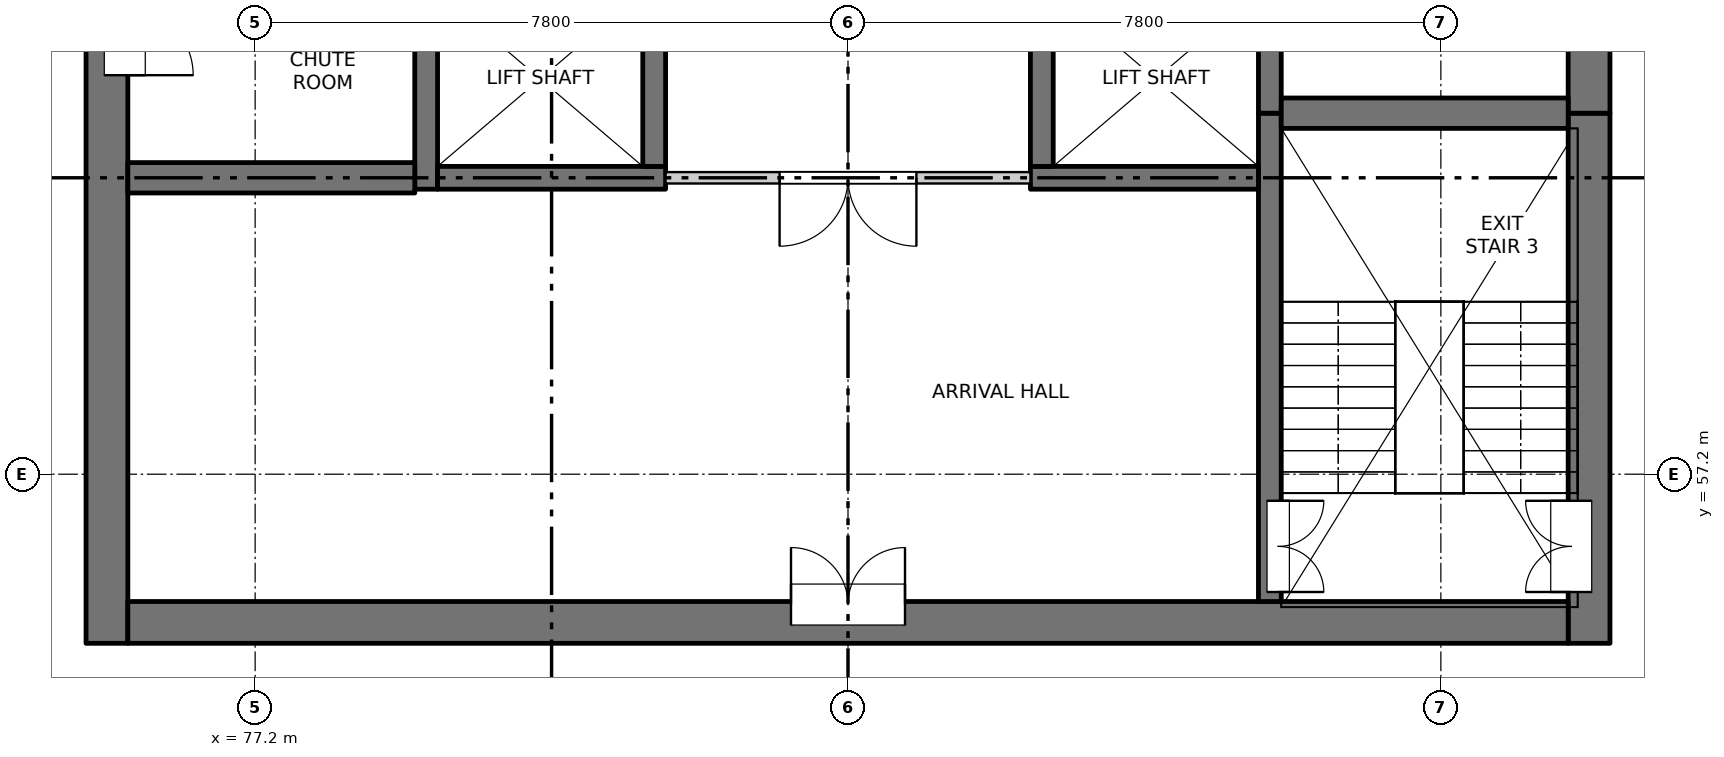
"""IFC4 building model, lengths in metres.
Left out: names, types, materials, properties, quantities, classifications, styles, units other than length and angle.
Written with IfcOpenShell. Run it as: python <this file> out.ifc"""

import sys

from ifc_helpers import new_model, si_unit, direction, frame, frame_2d, origin, place, context, subcontext, project, spatial, rectangle, extrude, element, fill, save


model = new_model("IFC4")
c1 = context("Model", 3, precision=1e-05, world=origin(), true_north=direction((0.0, 1.0)))
c2 = subcontext(c1, "Body", "Model", "MODEL_VIEW")
j1 = project(units=[si_unit("LENGTHUNIT", "METRE"), si_unit("PLANEANGLEUNIT", "RADIAN")], contexts=[c1])
p1 = place(None, origin())
s1 = spatial("IfcSite", under=j1, at=p1, CompositionType="ELEMENT")
p2 = place(p1, origin())
s2 = spatial("IfcBuilding", under=s1, at=p2, CompositionType="ELEMENT")
p3 = place(p2, frame((0.0, 0.0, 116.9)))
s3 = spatial("IfcBuildingStorey", under=s2, at=p3, CompositionType="ELEMENT", Elevation=116.9)
p4 = place(p3, frame((75.25, 54.975, -0.3), z_axis=(0.0, 0.0, 1.0), x_axis=(0.0, 1.0, 0.0)))
e1 = element("IfcWall", 1, at=p4, inside=s3, PredefinedType="SOLIDWALL", context=c2, shape_type="SweptSolid", body=[
    extrude(rectangle(XDim=22.325, YDim=0.55, at=frame_2d((11.163, 0.0))), origin(), (0.0, 0.0, 1.0), 6.8),
])
p5 = place(p4, frame((7.475, 0.0, 0.3)))
e2 = element("IfcOpeningElement", 2, at=p5, cuts=e1, PredefinedType="OPENING", context=c2, shape_type="SweptSolid", body=[
    extrude(rectangle(XDim=0.9, YDim=2.1, at=frame_2d((0.45, 1.05))), frame((0.0, 0.285, 0.0), z_axis=(0.0, -1.0, 0.0), x_axis=(1.0, 0.0, 0.0)), (0.0, 0.0, 1.0), 0.57),
])
p6 = place(p4, frame((12.125, 0.0, 0.3)))
e3 = element("IfcOpeningElement", 3, at=p6, cuts=e1, PredefinedType="OPENING", context=c2, shape_type="SweptSolid", body=[
    extrude(rectangle(XDim=0.9, YDim=2.1, at=frame_2d((0.45, 1.05))), frame((0.0, 0.285, 0.0), z_axis=(0.0, -1.0, 0.0), x_axis=(1.0, 0.0, 0.0)), (0.0, 0.0, 1.0), 0.57),
])
p7 = place(p4, frame((16.625, 0.0, 0.3)))
e4 = element("IfcOpeningElement", 4, at=p7, cuts=e1, PredefinedType="OPENING", context=c2, shape_type="SweptSolid", body=[
    extrude(rectangle(XDim=0.9, YDim=2.1, at=frame_2d((0.45, 1.05))), frame((0.0, 0.285, 0.0), z_axis=(0.0, -1.0, 0.0), x_axis=(1.0, 0.0, 0.0)), (0.0, 0.0, 1.0), 0.57),
])
p8 = place(p4, frame((20.075, 0.0, 0.3)))
e5 = element("IfcOpeningElement", 5, at=p8, cuts=e1, PredefinedType="OPENING", context=c2, shape_type="SweptSolid", body=[
    extrude(rectangle(XDim=0.9, YDim=2.1, at=frame_2d((0.45, 1.05))), frame((0.0, 0.285, 0.0), z_axis=(0.0, -1.0, 0.0), x_axis=(1.0, 0.0, 0.0)), (0.0, 0.0, 1.0), 0.57),
])
p9 = place(p3, frame((94.75, 54.975, -0.3), z_axis=(0.0, 0.0, 1.0), x_axis=(0.0, 1.0, 0.0)))
e6 = element("IfcWall", 6, at=p9, inside=s3, PredefinedType="SOLIDWALL", context=c2, shape_type="SweptSolid", body=[
    extrude(rectangle(XDim=6.975, YDim=0.55, at=frame_2d((3.487, 0.0))), origin(), (0.0, 0.0, 1.0), 6.8),
])
p10 = place(p9, frame((0.675, 0.0, 0.3)))
e7 = element("IfcOpeningElement", 7, at=p10, cuts=e6, PredefinedType="OPENING", context=c2, shape_type="SweptSolid", body=[
    extrude(rectangle(XDim=1.2, YDim=2.1, at=frame_2d((0.6, 1.05))), frame((0.0, 0.285, 0.0), z_axis=(0.0, -1.0, 0.0), x_axis=(1.0, 0.0, 0.0)), (0.0, 0.0, 1.0), 0.57),
])
p11 = place(p3, frame((94.75, 61.95, -0.3), z_axis=(0.0, 0.0, 1.0), x_axis=(0.0, 1.0, 0.0)))
e8 = element("IfcWall", 8, at=p11, inside=s3, PredefinedType="SOLIDWALL", context=c2, shape_type="SweptSolid", body=[
    extrude(rectangle(XDim=15.35, YDim=0.55, at=frame_2d((7.675, 0.0))), origin(), (0.0, 0.0, 1.0), 6.8),
])
p12 = place(p11, frame((0.925, 0.0, 0.3)))
e9 = element("IfcOpeningElement", 9, at=p12, cuts=e8, PredefinedType="OPENING", context=c2, shape_type="SweptSolid", body=[
    extrude(rectangle(XDim=0.9, YDim=2.1, at=frame_2d((0.45, 1.05))), frame((0.0, 0.285, 0.0), z_axis=(0.0, -1.0, 0.0), x_axis=(1.0, 0.0, 0.0)), (0.0, 0.0, 1.0), 0.57),
])
p13 = place(p11, frame((3.8, 0.0, 0.3)))
e10 = element("IfcOpeningElement", 10, at=p13, cuts=e8, PredefinedType="OPENING", context=c2, shape_type="SweptSolid", body=[
    extrude(rectangle(XDim=0.9, YDim=2.1, at=frame_2d((0.45, 1.05))), frame((0.0, 0.285, 0.0), z_axis=(0.0, -1.0, 0.0), x_axis=(1.0, 0.0, 0.0)), (0.0, 0.0, 1.0), 0.57),
])
p14 = place(p11, frame((8.3, 0.0, 0.3)))
e11 = element("IfcOpeningElement", 11, at=p14, cuts=e8, PredefinedType="OPENING", context=c2, shape_type="SweptSolid", body=[
    extrude(rectangle(XDim=0.9, YDim=2.1, at=frame_2d((0.45, 1.05))), frame((0.0, 0.285, 0.0), z_axis=(0.0, -1.0, 0.0), x_axis=(1.0, 0.0, 0.0)), (0.0, 0.0, 1.0), 0.57),
])
p15 = place(p11, frame((13.1, 0.0, 0.3)))
e12 = element("IfcOpeningElement", 12, at=p15, cuts=e8, PredefinedType="OPENING", context=c2, shape_type="SweptSolid", body=[
    extrude(rectangle(XDim=0.9, YDim=2.1, at=frame_2d((0.45, 1.05))), frame((0.0, 0.285, 0.0), z_axis=(0.0, -1.0, 0.0), x_axis=(1.0, 0.0, 0.0)), (0.0, 0.0, 1.0), 0.57),
])
p16 = place(p3, frame((75.525, 55.25, -0.3), z_axis=(0.0, 0.0, 1.0), x_axis=(1.0, 0.0, 0.0)))
e13 = element("IfcWall", 13, at=p16, inside=s3, PredefinedType="SOLIDWALL", context=c2, shape_type="SweptSolid", body=[
    extrude(rectangle(XDim=18.95, YDim=0.55, at=frame_2d((9.475, 0.0))), origin(), (0.0, 0.0, 1.0), 6.8),
])
p17 = place(p16, frame((8.725, 0.0, 0.3)))
e14 = element("IfcOpeningElement", 14, at=p17, cuts=e13, PredefinedType="OPENING", context=c2, shape_type="SweptSolid", body=[
    extrude(rectangle(XDim=1.5, YDim=2.1, at=frame_2d((0.75, 1.05))), frame((0.0, 0.285, 0.0), z_axis=(0.0, -1.0, 0.0), x_axis=(1.0, 0.0, 0.0)), (0.0, 0.0, 1.0), 0.57),
])
p18 = place(p3, frame((79.45, 60.95, -0.3), z_axis=(0.0, 0.0, 1.0), x_axis=(0.0, 1.0, 0.0)))
e15 = element("IfcWall", 15, at=p18, inside=s3, PredefinedType="SOLIDWALL", context=c2, shape_type="SweptSolid", body=[
    extrude(rectangle(XDim=16.35, YDim=0.3, at=frame_2d((8.175, 0.0))), origin(), (0.0, 0.0, 1.0), 6.8),
])
p19 = place(p3, frame((90.55, 55.525, -0.3), z_axis=(0.0, 0.0, 1.0), x_axis=(0.0, 1.0, 0.0)))
e16 = element("IfcWall", 16, at=p19, inside=s3, PredefinedType="SOLIDWALL", context=c2, shape_type="SweptSolid", body=[
    extrude(rectangle(XDim=6.425, YDim=0.3, at=frame_2d((3.212, 0.0))), origin(), (0.0, 0.0, 1.0), 6.8),
])
p20 = place(p19, frame((0.125, 0.0, 0.3)))
e17 = element("IfcOpeningElement", 17, at=p20, cuts=e16, PredefinedType="OPENING", context=c2, shape_type="SweptSolid", body=[
    extrude(rectangle(XDim=1.2, YDim=2.1, at=frame_2d((0.6, 1.05))), frame((0.0, 0.16, 0.0), z_axis=(0.0, -1.0, 0.0), x_axis=(1.0, 0.0, 0.0)), (0.0, 0.0, 1.0), 0.32),
])
p21 = place(p3, frame((90.55, 61.95, -0.3), z_axis=(0.0, 0.0, 1.0), x_axis=(0.0, 1.0, 0.0)))
e18 = element("IfcWall", 18, at=p21, inside=s3, PredefinedType="SOLIDWALL", context=c2, shape_type="SweptSolid", body=[
    extrude(rectangle(XDim=15.35, YDim=0.3, at=frame_2d((7.675, 0.0))), origin(), (0.0, 0.0, 1.0), 6.8),
])
p22 = place(p3, frame((79.6, 61.1, -0.3), z_axis=(0.0, 0.0, 1.0), x_axis=(1.0, 0.0, 0.0)))
e19 = element("IfcWall", 19, at=p22, inside=s3, PredefinedType="SOLIDWALL", context=c2, shape_type="SweptSolid", body=[
    extrude(rectangle(XDim=3.0, YDim=0.3, at=frame_2d((1.5, 0.0))), origin(), (0.0, 0.0, 1.0), 6.8),
])
p23 = place(p3, frame((82.45, 61.25, -0.3), z_axis=(0.0, 0.0, 1.0), x_axis=(0.0, 1.0, 0.0)))
e20 = element("IfcWall", 20, at=p23, inside=s3, PredefinedType="SOLIDWALL", context=c2, shape_type="SweptSolid", body=[
    extrude(rectangle(XDim=2.3, YDim=0.3, at=frame_2d((1.15, 0.0))), origin(), (0.0, 0.0, 1.0), 6.8),
])
p24 = place(p3, frame((87.4, 61.1, -0.3), z_axis=(0.0, 0.0, 1.0), x_axis=(1.0, 0.0, 0.0)))
e21 = element("IfcWall", 21, at=p24, inside=s3, PredefinedType="SOLIDWALL", context=c2, shape_type="SweptSolid", body=[
    extrude(rectangle(XDim=3.0, YDim=0.3, at=frame_2d((1.5, 0.0))), origin(), (0.0, 0.0, 1.0), 6.8),
])
p25 = place(p3, frame((87.55, 61.25, -0.3), z_axis=(0.0, 0.0, 1.0), x_axis=(0.0, 1.0, 0.0)))
e22 = element("IfcWall", 22, at=p25, inside=s3, PredefinedType="SOLIDWALL", context=c2, shape_type="SweptSolid", body=[
    extrude(rectangle(XDim=2.3, YDim=0.3, at=frame_2d((1.15, 0.0))), origin(), (0.0, 0.0, 1.0), 6.8),
])
for number, where, z_axis, x_axis in (
    (23, (75.525, 61.1, -0.3), (0.0, 0.0, 1.0), (1.0, 0.0, 0.0)),
    (24, (90.7, 61.95, -0.3), (0.0, 0.0, 1.0), (1.0, 0.0, 0.0)),
):
    element("IfcWall", number, at=place(p3, frame(where, z_axis=z_axis, x_axis=x_axis)), inside=s3, PredefinedType="SOLIDWALL", context=c2, shape_type="SweptSolid", body=[
        extrude(rectangle(XDim=3.775, YDim=0.4, at=frame_2d((1.888, 0.0))), origin(), (0.0, 0.0, 1.0), 6.8),
    ])
p26 = place(p3, frame((82.6, 61.1, 0.0), z_axis=(0.0, 0.0, 1.0), x_axis=(1.0, 0.0, 0.0)))
e25 = element("IfcWall", 25, at=p26, inside=s3, PredefinedType="PARTITIONING", context=c2, shape_type="SweptSolid", body=[
    extrude(rectangle(XDim=4.8, YDim=0.15, at=frame_2d((2.4, 0.0))), origin(), (0.0, 0.0, 1.0), 6.5),
])
p27 = place(p26, frame((1.5, 0.0, 0.0)))
e26 = element("IfcOpeningElement", 26, at=p27, cuts=e25, PredefinedType="OPENING", context=c2, shape_type="SweptSolid", body=[
    extrude(rectangle(XDim=1.8, YDim=2.1, at=frame_2d((0.9, 1.05))), frame((0.0, 0.085, 0.0), z_axis=(0.0, -1.0, 0.0), x_axis=(1.0, 0.0, 0.0)), (0.0, 0.0, 1.0), 0.17),
])
p28 = place(p17, origin())
e27 = element("IfcDoor", 27, at=p28, inside=s3, OperationType="DOUBLE_DOOR_SINGLE_SWING", PredefinedType="DOOR", context=c2, shape_type="SweptSolid", body=[
    extrude(rectangle(XDim=1.5, YDim=2.1, at=frame_2d((0.75, 1.05))), frame((0.0, 0.26, 0.0), z_axis=(0.0, -1.0, 0.0), x_axis=(1.0, 0.0, 0.0)), (0.0, 0.0, 1.0), 0.05),
])
fill(e14, e27)
p29 = place(p20, origin())
e28 = element("IfcDoor", 28, at=p29, inside=s3, OperationType="DOUBLE_DOOR_SINGLE_SWING", PredefinedType="DOOR", context=c2, shape_type="SweptSolid", body=[
    extrude(rectangle(XDim=1.2, YDim=2.1, at=frame_2d((0.6, 1.05))), frame((0.0, -0.085, 0.0), z_axis=(0.0, -1.0, 0.0), x_axis=(1.0, 0.0, 0.0)), (0.0, 0.0, 1.0), 0.05),
])
fill(e17, e28)
p30 = place(p10, origin())
e29 = element("IfcDoor", 29, at=p30, inside=s3, OperationType="DOUBLE_DOOR_SINGLE_SWING", PredefinedType="DOOR", context=c2, shape_type="SweptSolid", body=[
    extrude(rectangle(XDim=1.2, YDim=2.1, at=frame_2d((0.6, 1.05))), frame((0.0, 0.26, 0.0), z_axis=(0.0, -1.0, 0.0), x_axis=(1.0, 0.0, 0.0)), (0.0, 0.0, 1.0), 0.05),
])
fill(e7, e29)
p31 = place(p27, origin())
e30 = element("IfcDoor", 30, at=p31, inside=s3, OperationType="DOUBLE_DOOR_SINGLE_SWING", PredefinedType="DOOR", context=c2, shape_type="SweptSolid", body=[
    extrude(rectangle(XDim=1.8, YDim=2.1, at=frame_2d((0.9, 1.05))), frame((0.0, 0.025, 0.0), z_axis=(0.0, -1.0, 0.0), x_axis=(1.0, 0.0, 0.0)), (0.0, 0.0, 1.0), 0.05),
])
fill(e26, e30)
p32 = place(p5, origin())
e31 = element("IfcDoor", 31, at=p32, inside=s3, OperationType="SINGLE_SWING_RIGHT", PredefinedType="DOOR", context=c2, shape_type="SweptSolid", body=[
    extrude(rectangle(XDim=0.9, YDim=2.1, at=frame_2d((0.45, 1.05))), frame((0.0, -0.21, 0.0), z_axis=(0.0, -1.0, 0.0), x_axis=(1.0, 0.0, 0.0)), (0.0, 0.0, 1.0), 0.05),
])
fill(e2, e31)
save(model, sys.argv[1])
